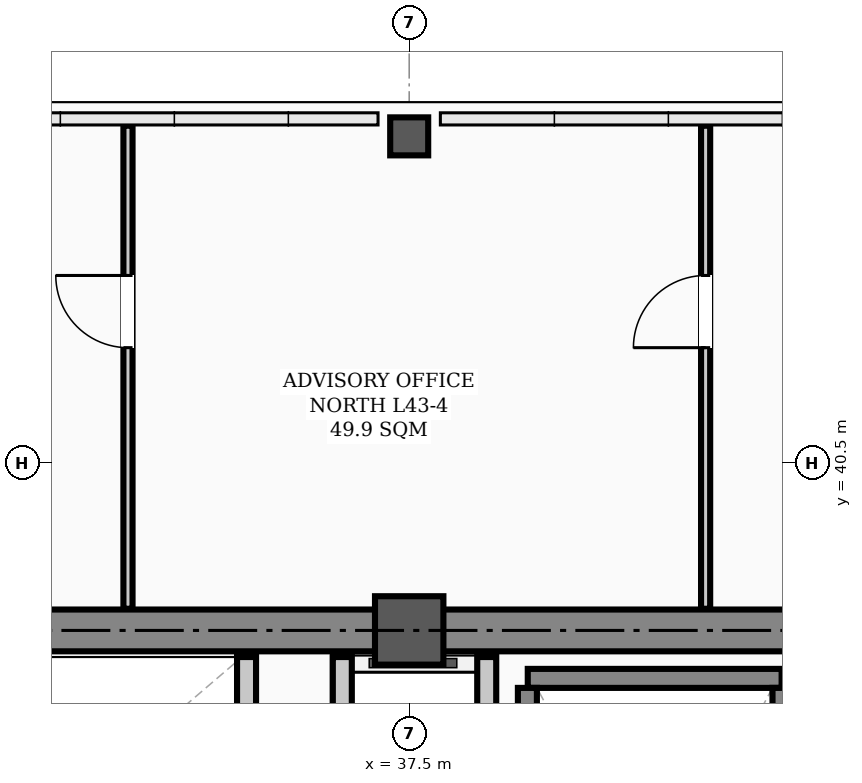
"""IFC4 building model, lengths in metres.
Left out: names, types, materials, properties, quantities, classifications, styles, units other than length and angle.
Written with IfcOpenShell. Run it as: python <this file> out.ifc"""

import sys

from ifc_helpers import new_model, si_unit, direction, frame, frame_2d, origin, origin_2d, place, context, subcontext, project, spatial, rectangle, hollow_rectangle, extrude, element, fill, save


model = new_model("IFC4")
c1 = context("Model", 3, precision=1e-05, world=origin(), true_north=direction((0.0, 1.0)))
c2 = subcontext(c1, "Body", "Model", "MODEL_VIEW")
j1 = project(units=[si_unit("LENGTHUNIT", "METRE"), si_unit("PLANEANGLEUNIT", "RADIAN")], contexts=[c1])
p1 = place(None, origin())
s1 = spatial("IfcSite", under=j1, at=p1, CompositionType="ELEMENT")
p2 = place(p1, origin())
s2 = spatial("IfcBuilding", under=s1, at=p2, CompositionType="ELEMENT")
p3 = place(p2, frame((0.0, 0.0, 173.4)))
s3 = spatial("IfcBuildingStorey", under=s2, at=p3, CompositionType="ELEMENT", Elevation=173.4)
p4 = place(p3, frame((37.5, 38.3, 0.0), z_axis=(0.0, 0.0, 1.0), x_axis=(1.0, 0.0, 0.0)))
e1 = element("IfcColumn", 1, at=p4, inside=s3, PredefinedType="COLUMN", context=c2, shape_type="SweptSolid", body=[
    extrude(hollow_rectangle(XDim=0.9, YDim=0.9, WallThickness=0.035, InnerFilletRadius=0.017, OuterFilletRadius=0.052, at=origin_2d()), origin(), (0.0, 0.0, 1.0), 3.9),
])
p5 = place(p3, frame((37.5, 44.8, 0.0), z_axis=(0.0, 0.0, 1.0), x_axis=(1.0, 0.0, 0.0)))
e2 = element("IfcColumn", 2, at=p5, inside=s3, PredefinedType="COLUMN", context=c2, shape_type="SweptSolid", body=[
    extrude(hollow_rectangle(XDim=0.5, YDim=0.5, WallThickness=0.024, InnerFilletRadius=0.012, OuterFilletRadius=0.036, at=origin_2d()), origin(), (0.0, 0.0, 1.0), 3.9),
])
p6 = place(p3, frame((13.5, 38.3, 0.0), z_axis=(0.0, 0.0, 1.0), x_axis=(1.0, 0.0, 0.0)))
e3 = element("IfcWall", 3, at=p6, inside=s3, PredefinedType="SHEAR", context=c2, shape_type="SweptSolid", body=[
    extrude(rectangle(XDim=30.5, YDim=0.55, at=frame_2d((15.25, 0.0))), origin(), (0.0, 0.0, 1.0), 3.72),
])
p7 = place(p3, frame((39.06, 37.669, 0.0), z_axis=(0.0, 0.0, 1.0), x_axis=(1.0, 0.0, 0.0)))
e4 = element("IfcWall", 4, at=p7, inside=s3, PredefinedType="STANDARD", context=c2, shape_type="SweptSolid", body=[
    extrude(rectangle(XDim=3.34, YDim=0.25, at=frame_2d((1.67, 0.0))), origin(), (0.0, 0.0, 1.0), 3.72),
])
for number, where, z_axis, x_axis in (
    (5, (39.055, 30.36, 0.0), (0.0, 0.0, 1.0), (0.0, 1.0, 0.0)),
    (6, (42.405, 30.36, 0.0), (0.0, 0.0, 1.0), (0.0, 1.0, 0.0)),
):
    element("IfcWall", number, at=place(p3, frame(where, z_axis=z_axis, x_axis=x_axis)), inside=s3, PredefinedType="STANDARD", context=c2, shape_type="SweptSolid", body=[
        extrude(rectangle(XDim=7.184, YDim=0.25, at=frame_2d((3.592, 0.0))), origin(), (0.0, 0.0, 1.0), 3.72),
    ])
p8 = place(p3, frame((36.62, 31.95, 0.0), z_axis=(0.0, 0.0, 1.0), x_axis=(0.0, 1.0, 0.0)))
e7 = element("IfcWall", 7, at=p8, inside=s3, PredefinedType="STANDARD", context=c2, shape_type="SweptSolid", body=[
    extrude(rectangle(XDim=6.0, YDim=0.25, at=frame_2d((3.0, 0.0))), origin(), (0.0, 0.0, 1.0), 3.35),
])
p9 = place(p8, frame((0.9, 0.0, 0.0)))
e8 = element("IfcOpeningElement", 8, at=p9, cuts=e7, PredefinedType="OPENING", context=c2, shape_type="SweptSolid", body=[
    extrude(rectangle(XDim=1.1, YDim=2.08, at=frame_2d((0.55, 1.04))), frame((0.0, 0.135, 0.0), z_axis=(0.0, -1.0, 0.0), x_axis=(1.0, 0.0, 0.0)), (0.0, 0.0, 1.0), 0.27),
])
p10 = place(p8, frame((4.0, 0.0, 0.0)))
e9 = element("IfcOpeningElement", 9, at=p10, cuts=e7, PredefinedType="OPENING", context=c2, shape_type="SweptSolid", body=[
    extrude(rectangle(XDim=1.1, YDim=2.08, at=frame_2d((0.55, 1.04))), frame((0.0, 0.135, 0.0), z_axis=(0.0, -1.0, 0.0), x_axis=(1.0, 0.0, 0.0)), (0.0, 0.0, 1.0), 0.27),
])
p11 = place(p3, frame((38.52, 31.95, 0.0), z_axis=(0.0, 0.0, 1.0), x_axis=(0.0, 1.0, 0.0)))
e10 = element("IfcWall", 10, at=p11, inside=s3, PredefinedType="STANDARD", context=c2, shape_type="SweptSolid", body=[
    extrude(rectangle(XDim=6.0, YDim=0.25, at=frame_2d((3.0, 0.0))), origin(), (0.0, 0.0, 1.0), 3.35),
])
p12 = place(p3, frame((35.36, 34.9, 0.0), z_axis=(0.0, 0.0, 1.0), x_axis=(0.0, 1.0, 0.0)))
e11 = element("IfcWall", 11, at=p12, inside=s3, PredefinedType="STANDARD", context=c2, shape_type="SweptSolid", body=[
    extrude(rectangle(XDim=3.05, YDim=0.25, at=frame_2d((1.525, 0.0))), origin(), (0.0, 0.0, 1.0), 3.35),
])
p13 = place(p3, frame((33.8, 38.585, 0.0), z_axis=(0.0, 0.0, 1.0), x_axis=(0.0, 1.0, 0.0)))
e12 = element("IfcWall", 12, at=p13, inside=s3, PredefinedType="PARTITIONING", context=c2, shape_type="SweptSolid", body=[
    extrude(rectangle(XDim=6.355, YDim=0.12, at=frame_2d((3.177, 0.0))), origin(), (0.0, 0.0, 1.0), 3.212),
])
p14 = place(p13, frame((3.435, 0.0, 0.0)))
e13 = element("IfcOpeningElement", 13, at=p14, cuts=e12, PredefinedType="OPENING", context=c2, shape_type="SweptSolid", body=[
    extrude(rectangle(XDim=0.95, YDim=2.08, at=frame_2d((0.475, 1.04))), frame((0.0, 0.07, 0.0), z_axis=(0.0, -1.0, 0.0), x_axis=(1.0, 0.0, 0.0)), (0.0, 0.0, 1.0), 0.14),
])
p15 = place(p3, frame((41.4, 38.585, 0.0), z_axis=(0.0, 0.0, 1.0), x_axis=(0.0, 1.0, 0.0)))
e14 = element("IfcWall", 14, at=p15, inside=s3, PredefinedType="PARTITIONING", context=c2, shape_type="SweptSolid", body=[
    extrude(rectangle(XDim=6.355, YDim=0.12, at=frame_2d((3.177, 0.0))), origin(), (0.0, 0.0, 1.0), 3.212),
])
p16 = place(p15, frame((3.435, 0.0, 0.0)))
e15 = element("IfcOpeningElement", 15, at=p16, cuts=e14, PredefinedType="OPENING", context=c2, shape_type="SweptSolid", body=[
    extrude(rectangle(XDim=0.95, YDim=2.08, at=frame_2d((0.475, 1.04))), frame((0.0, 0.07, 0.0), z_axis=(0.0, -1.0, 0.0), x_axis=(1.0, 0.0, 0.0)), (0.0, 0.0, 1.0), 0.14),
])
p17 = place(p14, origin())
e16 = element("IfcDoor", 16, at=p17, inside=s3, OperationType="SINGLE_SWING_RIGHT", PredefinedType="DOOR", context=c2, shape_type="SweptSolid", body=[
    extrude(rectangle(XDim=0.95, YDim=2.08, at=frame_2d((0.475, 1.04))), frame((0.0, 0.025, 0.0), z_axis=(0.0, -1.0, 0.0), x_axis=(1.0, 0.0, 0.0)), (0.0, 0.0, 1.0), 0.05),
])
fill(e13, e16)
p18 = place(p16, origin())
e17 = element("IfcDoor", 17, at=p18, inside=s3, OperationType="SINGLE_SWING_LEFT", PredefinedType="DOOR", context=c2, shape_type="SweptSolid", body=[
    extrude(rectangle(XDim=0.95, YDim=2.08, at=frame_2d((0.475, 1.04))), frame((0.0, 0.025, 0.0), z_axis=(0.0, -1.0, 0.0), x_axis=(1.0, 0.0, 0.0)), (0.0, 0.0, 1.0), 0.05),
])
fill(e15, e17)
save(model, sys.argv[1])
